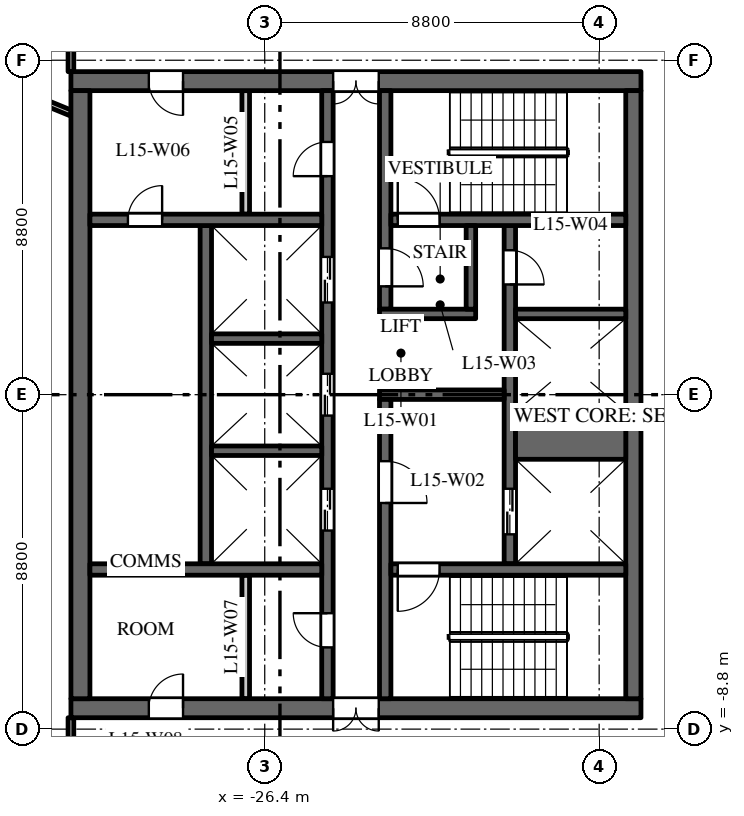
"""IFC4 building model, lengths in metres.
Left out: names, types, materials, properties, quantities, classifications, styles, units other than length and angle.
Written with IfcOpenShell. Run it as: python <this file> out.ifc"""

import sys

from ifc_helpers import new_model, si_unit, direction, frame, frame_2d, origin, place, context, subcontext, project, spatial, rectangle, extrude, element, fill, save


model = new_model("IFC4")
c1 = context("Model", 3, precision=1e-05, world=origin(), true_north=direction((0.0, 1.0)))
c2 = subcontext(c1, "Body", "Model", "MODEL_VIEW")
j1 = project(units=[si_unit("LENGTHUNIT", "METRE"), si_unit("PLANEANGLEUNIT", "RADIAN")], contexts=[c1])
p1 = place(None, origin())
s1 = spatial("IfcSite", under=j1, at=p1, CompositionType="ELEMENT")
p2 = place(p1, origin())
s2 = spatial("IfcBuilding", under=s1, at=p2, CompositionType="ELEMENT")
p3 = place(p2, frame((0.0, 0.0, 70.5)))
s3 = spatial("IfcBuildingStorey", under=s2, at=p3, CompositionType="ELEMENT", Elevation=70.5)
p4 = place(p3, frame((-16.5, 8.25, 0.0), z_axis=(0.0, 0.0, 1.0), x_axis=(-1.0, 0.0, 0.0)))
e1 = element("IfcWall", 1, at=p4, inside=s3, PredefinedType="SHEAR", context=c2, shape_type="SweptSolid", body=[
    extrude(rectangle(XDim=15.0, YDim=0.5, at=frame_2d((7.5, 0.0))), origin(), (0.0, 0.0, 1.0), 3.7),
])
p5 = place(p4, frame((6.9, 0.0, 0.0)))
e2 = element("IfcOpeningElement", 2, at=p5, cuts=e1, PredefinedType="OPENING", context=c2, shape_type="SweptSolid", body=[
    extrude(rectangle(XDim=1.2, YDim=2.1, at=frame_2d((0.6, 1.05))), frame((0.0, 0.26, 0.0), z_axis=(0.0, -1.0, 0.0), x_axis=(1.0, 0.0, 0.0)), (0.0, 0.0, 1.0), 0.52),
])
p6 = place(p4, frame((12.05, 0.0, 0.0)))
e3 = element("IfcOpeningElement", 3, at=p6, cuts=e1, PredefinedType="OPENING", context=c2, shape_type="SweptSolid", body=[
    extrude(rectangle(XDim=0.9, YDim=2.1, at=frame_2d((0.45, 1.05))), frame((0.0, 0.26, 0.0), z_axis=(0.0, -1.0, 0.0), x_axis=(1.0, 0.0, 0.0)), (0.0, 0.0, 1.0), 0.52),
])
p7 = place(p3, frame((-16.5, -8.25, 0.0), z_axis=(0.0, 0.0, 1.0), x_axis=(-1.0, 0.0, 0.0)))
e4 = element("IfcWall", 4, at=p7, inside=s3, PredefinedType="SHEAR", context=c2, shape_type="SweptSolid", body=[
    extrude(rectangle(XDim=15.0, YDim=0.5, at=frame_2d((7.5, 0.0))), origin(), (0.0, 0.0, 1.0), 3.7),
])
p8 = place(p7, frame((6.9, 0.0, 0.0)))
e5 = element("IfcOpeningElement", 5, at=p8, cuts=e4, PredefinedType="OPENING", context=c2, shape_type="SweptSolid", body=[
    extrude(rectangle(XDim=1.2, YDim=2.1, at=frame_2d((0.6, 1.05))), frame((0.0, 0.26, 0.0), z_axis=(0.0, -1.0, 0.0), x_axis=(1.0, 0.0, 0.0)), (0.0, 0.0, 1.0), 0.52),
])
p9 = place(p7, frame((12.05, 0.0, 0.0)))
e6 = element("IfcOpeningElement", 6, at=p9, cuts=e4, PredefinedType="OPENING", context=c2, shape_type="SweptSolid", body=[
    extrude(rectangle(XDim=0.9, YDim=2.1, at=frame_2d((0.45, 1.05))), frame((0.0, 0.26, 0.0), z_axis=(0.0, -1.0, 0.0), x_axis=(1.0, 0.0, 0.0)), (0.0, 0.0, 1.0), 0.52),
])
p10 = place(p3, frame((-27.95, -4.45, 0.0), z_axis=(0.0, 0.0, 1.0), x_axis=(0.0, 1.0, 0.0)))
e7 = element("IfcWall", 7, at=p10, inside=s3, PredefinedType="SHEAR", context=c2, shape_type="SweptSolid", body=[
    extrude(rectangle(XDim=8.9, YDim=0.3, at=frame_2d((4.45, 0.0))), origin(), (0.0, 0.0, 1.0), 3.7),
])
p11 = place(p3, frame((-19.95, -4.45, 0.0), z_axis=(0.0, 0.0, 1.0), x_axis=(0.0, 1.0, 0.0)))
e8 = element("IfcWall", 8, at=p11, inside=s3, PredefinedType="SHEAR", context=c2, shape_type="SweptSolid", body=[
    extrude(rectangle(XDim=8.9, YDim=0.3, at=frame_2d((4.45, 0.0))), origin(), (0.0, 0.0, 1.0), 3.7),
])
p12 = place(p11, frame((0.775, 0.0, 0.0)))
e9 = element("IfcOpeningElement", 9, at=p12, cuts=e8, PredefinedType="OPENING", context=c2, shape_type="SweptSolid", body=[
    extrude(rectangle(XDim=1.2, YDim=2.1, at=frame_2d((0.6, 1.05))), frame((0.0, 0.16, 0.0), z_axis=(0.0, -1.0, 0.0), x_axis=(1.0, 0.0, 0.0)), (0.0, 0.0, 1.0), 0.32),
])
p13 = place(p11, frame((7.35, 0.0, 0.0)))
e10 = element("IfcOpeningElement", 10, at=p13, cuts=e8, PredefinedType="OPENING", context=c2, shape_type="SweptSolid", body=[
    extrude(rectangle(XDim=0.9, YDim=2.1, at=frame_2d((0.45, 1.05))), frame((0.0, 0.16, 0.0), z_axis=(0.0, -1.0, 0.0), x_axis=(1.0, 0.0, 0.0)), (0.0, 0.0, 1.0), 0.32),
])
p14 = place(p3, frame((-24.75, -8.0, 0.0), z_axis=(0.0, 0.0, 1.0), x_axis=(0.0, 1.0, 0.0)))
e11 = element("IfcWall", 11, at=p14, inside=s3, PredefinedType="SHEAR", context=c2, shape_type="SweptSolid", body=[
    extrude(rectangle(XDim=16.0, YDim=0.3, at=frame_2d((8.0, 0.0))), origin(), (0.0, 0.0, 1.0), 3.7),
])
p15 = place(p14, frame((4.425, 0.0, 0.0)))
e12 = element("IfcOpeningElement", 12, at=p15, cuts=e11, PredefinedType="OPENING", context=c2, shape_type="SweptSolid", body=[
    extrude(rectangle(XDim=1.1, YDim=2.1, at=frame_2d((0.55, 1.05))), frame((0.0, 0.16, 0.0), z_axis=(0.0, -1.0, 0.0), x_axis=(1.0, 0.0, 0.0)), (0.0, 0.0, 1.0), 0.32),
])
p16 = place(p14, frame((7.45, 0.0, 0.0)))
e13 = element("IfcOpeningElement", 13, at=p16, cuts=e11, PredefinedType="OPENING", context=c2, shape_type="SweptSolid", body=[
    extrude(rectangle(XDim=1.1, YDim=2.1, at=frame_2d((0.55, 1.05))), frame((0.0, 0.16, 0.0), z_axis=(0.0, -1.0, 0.0), x_axis=(1.0, 0.0, 0.0)), (0.0, 0.0, 1.0), 0.32),
])
p17 = place(p14, frame((10.425, 0.0, 0.0)))
e14 = element("IfcOpeningElement", 14, at=p17, cuts=e11, PredefinedType="OPENING", context=c2, shape_type="SweptSolid", body=[
    extrude(rectangle(XDim=1.2, YDim=2.1, at=frame_2d((0.6, 1.05))), frame((0.0, 0.16, 0.0), z_axis=(0.0, -1.0, 0.0), x_axis=(1.0, 0.0, 0.0)), (0.0, 0.0, 1.0), 0.32),
])
p18 = place(p14, frame((13.75, 0.0, 0.0)))
e15 = element("IfcOpeningElement", 15, at=p18, cuts=e11, PredefinedType="OPENING", context=c2, shape_type="SweptSolid", body=[
    extrude(rectangle(XDim=0.9, YDim=2.1, at=frame_2d((0.45, 1.05))), frame((0.0, 0.16, 0.0), z_axis=(0.0, -1.0, 0.0), x_axis=(1.0, 0.0, 0.0)), (0.0, 0.0, 1.0), 0.32),
])
p19 = place(p14, frame((1.35, 0.0, 0.0)))
e16 = element("IfcOpeningElement", 16, at=p19, cuts=e11, PredefinedType="OPENING", context=c2, shape_type="SweptSolid", body=[
    extrude(rectangle(XDim=0.9, YDim=2.1, at=frame_2d((0.45, 1.05))), frame((0.0, 0.16, 0.0), z_axis=(0.0, -1.0, 0.0), x_axis=(1.0, 0.0, 0.0)), (0.0, 0.0, 1.0), 0.32),
])
p20 = place(p3, frame((-20.1, 0.0, 0.0), z_axis=(0.0, 0.0, 1.0), x_axis=(-1.0, 0.0, 0.0)))
e17 = element("IfcWall", 17, at=p20, inside=s3, PredefinedType="SHEAR", context=c2, shape_type="SweptSolid", body=[
    extrude(rectangle(XDim=3.28, YDim=0.25, at=frame_2d((1.64, 0.0))), origin(), (0.0, 0.0, 1.0), 3.7),
])
p21 = place(p3, frame((-16.7, -8.0, 0.0), z_axis=(0.0, 0.0, 1.0), x_axis=(0.0, 1.0, 0.0)))
e18 = element("IfcWall", 18, at=p21, inside=s3, PredefinedType="SHEAR", context=c2, shape_type="SweptSolid", body=[
    extrude(rectangle(XDim=16.0, YDim=0.4, at=frame_2d((8.0, 0.0))), origin(), (0.0, 0.0, 1.0), 3.7),
])
p22 = place(p3, frame((-31.25, -8.0, 0.0), z_axis=(0.0, 0.0, 1.0), x_axis=(0.0, 1.0, 0.0)))
e19 = element("IfcWall", 19, at=p22, inside=s3, PredefinedType="SHEAR", context=c2, shape_type="SweptSolid", body=[
    extrude(rectangle(XDim=16.0, YDim=0.5, at=frame_2d((8.0, 0.0))), origin(), (0.0, 0.0, 1.0), 3.7),
])
p23 = place(p3, frame((-24.9, 4.6, 0.0), z_axis=(0.0, 0.0, 1.0), x_axis=(-1.0, 0.0, 0.0)))
e20 = element("IfcWall", 20, at=p23, inside=s3, PredefinedType="SHEAR", context=c2, shape_type="SweptSolid", body=[
    extrude(rectangle(XDim=6.1, YDim=0.3, at=frame_2d((3.05, 0.0))), origin(), (0.0, 0.0, 1.0), 3.7),
])
p24 = place(p23, frame((4.2, 0.0, 0.0)))
e21 = element("IfcOpeningElement", 21, at=p24, cuts=e20, PredefinedType="OPENING", context=c2, shape_type="SweptSolid", body=[
    extrude(rectangle(XDim=0.9, YDim=2.1, at=frame_2d((0.45, 1.05))), frame((0.0, 0.16, 0.0), z_axis=(0.0, -1.0, 0.0), x_axis=(1.0, 0.0, 0.0)), (0.0, 0.0, 1.0), 0.32),
])
for number, where, z_axis, x_axis in (
    (22, (-26.9, 4.75, 0.0), (0.0, 0.0, 1.0), (0.0, 1.0, 0.0)),
    (23, (-26.9, -8.0, 0.0), (0.0, 0.0, 1.0), (0.0, 1.0, 0.0)),
):
    element("IfcWall", number, at=place(p3, frame(where, z_axis=z_axis, x_axis=x_axis)), inside=s3, PredefinedType="PARTITIONING", context=c2, shape_type="SweptSolid", body=[
        extrude(rectangle(XDim=3.25, YDim=0.2, at=frame_2d((1.625, 0.0))), origin(), (0.0, 0.0, 1.0), 3.7),
    ])
p25 = place(p3, frame((-24.9, -4.6, 0.0), z_axis=(0.0, 0.0, 1.0), x_axis=(-1.0, 0.0, 0.0)))
e24 = element("IfcWall", 24, at=p25, inside=s3, PredefinedType="SHEAR", context=c2, shape_type="SweptSolid", body=[
    extrude(rectangle(XDim=6.1, YDim=0.3, at=frame_2d((3.05, 0.0))), origin(), (0.0, 0.0, 1.0), 3.7),
])
p26 = place(p3, frame((-16.9, -1.075, 0.0), z_axis=(0.0, 0.0, 1.0), x_axis=(-1.0, 0.0, 0.0)))
e25 = element("IfcWall", 25, at=p26, inside=s3, PredefinedType="SHEAR", context=c2, shape_type="SweptSolid", body=[
    extrude(rectangle(XDim=2.9, YDim=1.25, at=frame_2d((1.45, 0.0))), origin(), (0.0, 0.0, 1.0), 3.7),
])
for number, where, z_axis, x_axis in (
    (26, (-16.9, 2.125, 0.0), (0.0, 0.0, 1.0), (-1.0, 0.0, 0.0)),
    (27, (-24.9, -1.475, 0.0), (0.0, 0.0, 1.0), (-1.0, 0.0, 0.0)),
    (28, (-24.9, 1.475, 0.0), (0.0, 0.0, 1.0), (-1.0, 0.0, 0.0)),
):
    element("IfcWall", number, at=place(p3, frame(where, z_axis=z_axis, x_axis=x_axis)), inside=s3, PredefinedType="SHEAR", context=c2, shape_type="SweptSolid", body=[
        extrude(rectangle(XDim=2.9, YDim=0.25, at=frame_2d((1.45, 0.0))), origin(), (0.0, 0.0, 1.0), 3.7),
    ])
p27 = place(p3, frame((-23.23, 2.25, 0.0), z_axis=(0.0, 0.0, 1.0), x_axis=(0.0, 1.0, 0.0)))
e29 = element("IfcWall", 29, at=p27, inside=s3, PredefinedType="SHEAR", context=c2, shape_type="SweptSolid", body=[
    extrude(rectangle(XDim=5.75, YDim=0.3, at=frame_2d((2.875, 0.0))), origin(), (0.0, 0.0, 1.0), 3.7),
])
p28 = place(p27, frame((0.6, 0.0, 0.0)))
e30 = element("IfcOpeningElement", 30, at=p28, cuts=e29, PredefinedType="OPENING", context=c2, shape_type="SweptSolid", body=[
    extrude(rectangle(XDim=1.0, YDim=2.1, at=frame_2d((0.5, 1.05))), frame((0.0, 0.16, 0.0), z_axis=(0.0, -1.0, 0.0), x_axis=(1.0, 0.0, 0.0)), (0.0, 0.0, 1.0), 0.32),
])
p29 = place(p3, frame((-23.23, -8.0, 0.0), z_axis=(0.0, 0.0, 1.0), x_axis=(0.0, 1.0, 0.0)))
e31 = element("IfcWall", 31, at=p29, inside=s3, PredefinedType="SHEAR", context=c2, shape_type="SweptSolid", body=[
    extrude(rectangle(XDim=7.875, YDim=0.3, at=frame_2d((3.938, 0.0))), origin(), (0.0, 0.0, 1.0), 3.7),
])
p30 = place(p29, frame((5.15, 0.0, 0.0)))
e32 = element("IfcOpeningElement", 32, at=p30, cuts=e31, PredefinedType="OPENING", context=c2, shape_type="SweptSolid", body=[
    extrude(rectangle(XDim=1.1, YDim=2.1, at=frame_2d((0.55, 1.05))), frame((0.0, 0.16, 0.0), z_axis=(0.0, -1.0, 0.0), x_axis=(1.0, 0.0, 0.0)), (0.0, 0.0, 1.0), 0.32),
])
p31 = place(p3, frame((-16.9, 4.6, 0.0), z_axis=(0.0, 0.0, 1.0), x_axis=(-1.0, 0.0, 0.0)))
e33 = element("IfcWall", 33, at=p31, inside=s3, PredefinedType="SHEAR", context=c2, shape_type="SweptSolid", body=[
    extrude(rectangle(XDim=6.18, YDim=0.3, at=frame_2d((3.09, 0.0))), origin(), (0.0, 0.0, 1.0), 3.7),
])
p32 = place(p31, frame((4.9, 0.0, 0.0)))
e34 = element("IfcOpeningElement", 34, at=p32, cuts=e33, PredefinedType="OPENING", context=c2, shape_type="SweptSolid", body=[
    extrude(rectangle(XDim=1.1, YDim=2.1, at=frame_2d((0.55, 1.05))), frame((0.0, 0.16, 0.0), z_axis=(0.0, -1.0, 0.0), x_axis=(1.0, 0.0, 0.0)), (0.0, 0.0, 1.0), 0.32),
])
p33 = place(p3, frame((-16.9, -4.6, 0.0), z_axis=(0.0, 0.0, 1.0), x_axis=(-1.0, 0.0, 0.0)))
e35 = element("IfcWall", 35, at=p33, inside=s3, PredefinedType="SHEAR", context=c2, shape_type="SweptSolid", body=[
    extrude(rectangle(XDim=6.18, YDim=0.3, at=frame_2d((3.09, 0.0))), origin(), (0.0, 0.0, 1.0), 3.7),
])
p34 = place(p33, frame((4.9, 0.0, 0.0)))
e36 = element("IfcOpeningElement", 36, at=p34, cuts=e35, PredefinedType="OPENING", context=c2, shape_type="SweptSolid", body=[
    extrude(rectangle(XDim=1.1, YDim=2.1, at=frame_2d((0.55, 1.05))), frame((0.0, 0.16, 0.0), z_axis=(0.0, -1.0, 0.0), x_axis=(1.0, 0.0, 0.0)), (0.0, 0.0, 1.0), 0.32),
])
p35 = place(p3, frame((-20.85, 2.125, 0.0), z_axis=(0.0, 0.0, 1.0), x_axis=(-1.0, 0.0, 0.0)))
e37 = element("IfcWall", 37, at=p35, inside=s3, PredefinedType="SHEAR", context=c2, shape_type="SweptSolid", body=[
    extrude(rectangle(XDim=2.53, YDim=0.25, at=frame_2d((1.265, 0.0))), origin(), (0.0, 0.0, 1.0), 3.7),
])
p36 = place(p3, frame((-20.975, 2.25, 0.0), z_axis=(0.0, 0.0, 1.0), x_axis=(0.0, 1.0, 0.0)))
e38 = element("IfcWall", 38, at=p36, inside=s3, PredefinedType="SHEAR", context=c2, shape_type="SweptSolid", body=[
    extrude(rectangle(XDim=2.2, YDim=0.25, at=frame_2d((1.1, 0.0))), origin(), (0.0, 0.0, 1.0), 3.7),
])
p37 = place(p3, frame((-34.234, 8.53, 0.0), z_axis=(0.0, 0.0, 1.0), x_axis=(0.925344112436, -0.379128307542, 0.0)))
e39 = element("IfcWall", 39, at=p37, inside=s3, PredefinedType="PARTITIONING", context=c2, shape_type="SweptSolid", body=[
    extrude(rectangle(XDim=2.954, YDim=0.15, at=frame_2d((1.477, 0.0))), origin(), (0.0, 0.0, 1.0), 2.85),
])
for number, where, z_axis, x_axis in (
    (40, (-31.5, -10.7, 0.0), (0.0, 0.0, 1.0), (0.0, 1.0, 0.0)),
    (41, (-31.5, 8.5, 0.0), (0.0, 0.0, 1.0), (0.0, 1.0, 0.0)),
):
    element("IfcWall", number, at=place(p3, frame(where, z_axis=z_axis, x_axis=x_axis)), inside=s3, PredefinedType="PARTITIONING", context=c2, shape_type="SweptSolid", body=[
        extrude(rectangle(XDim=2.2, YDim=0.15, at=frame_2d((1.1, 0.0))), origin(), (0.0, 0.0, 1.0), 3.7),
    ])
p38 = place(p12, origin())
e42 = element("IfcDoor", 42, at=p38, inside=s3, OperationType="DOUBLE_DOOR_SLIDING", PredefinedType="DOOR", context=c2, shape_type="SweptSolid", body=[
    extrude(rectangle(XDim=1.2, YDim=2.1, at=frame_2d((0.6, 1.05))), frame((0.0, 0.025, 0.0), z_axis=(0.0, -1.0, 0.0), x_axis=(1.0, 0.0, 0.0)), (0.0, 0.0, 1.0), 0.05),
])
fill(e9, e42)
p39 = place(p15, origin())
e43 = element("IfcDoor", 43, at=p39, inside=s3, OperationType="DOUBLE_DOOR_SLIDING", PredefinedType="DOOR", context=c2, shape_type="SweptSolid", body=[
    extrude(rectangle(XDim=1.1, YDim=2.1, at=frame_2d((0.55, 1.05))), frame((0.0, 0.025, 0.0), z_axis=(0.0, -1.0, 0.0), x_axis=(1.0, 0.0, 0.0)), (0.0, 0.0, 1.0), 0.05),
])
fill(e12, e43)
p40 = place(p16, origin())
e44 = element("IfcDoor", 44, at=p40, inside=s3, OperationType="DOUBLE_DOOR_SLIDING", PredefinedType="DOOR", context=c2, shape_type="SweptSolid", body=[
    extrude(rectangle(XDim=1.1, YDim=2.1, at=frame_2d((0.55, 1.05))), frame((0.0, 0.025, 0.0), z_axis=(0.0, -1.0, 0.0), x_axis=(1.0, 0.0, 0.0)), (0.0, 0.0, 1.0), 0.05),
])
fill(e13, e44)
p41 = place(p17, origin())
e45 = element("IfcDoor", 45, at=p41, inside=s3, OperationType="DOUBLE_DOOR_SLIDING", PredefinedType="DOOR", context=c2, shape_type="SweptSolid", body=[
    extrude(rectangle(XDim=1.2, YDim=2.1, at=frame_2d((0.6, 1.05))), frame((0.0, 0.025, 0.0), z_axis=(0.0, -1.0, 0.0), x_axis=(1.0, 0.0, 0.0)), (0.0, 0.0, 1.0), 0.05),
])
fill(e14, e45)
p42 = place(p32, origin())
e46 = element("IfcDoor", 46, at=p42, inside=s3, OperationType="SINGLE_SWING_RIGHT", PredefinedType="DOOR", context=c2, shape_type="SweptSolid", body=[
    extrude(rectangle(XDim=1.1, YDim=2.1, at=frame_2d((0.55, 1.05))), frame((0.0, 0.025, 0.0), z_axis=(0.0, -1.0, 0.0), x_axis=(1.0, 0.0, 0.0)), (0.0, 0.0, 1.0), 0.05),
])
fill(e34, e46)
p43 = place(p34, origin())
e47 = element("IfcDoor", 47, at=p43, inside=s3, OperationType="SINGLE_SWING_LEFT", PredefinedType="DOOR", context=c2, shape_type="SweptSolid", body=[
    extrude(rectangle(XDim=1.1, YDim=2.1, at=frame_2d((0.55, 1.05))), frame((0.0, 0.025, 0.0), z_axis=(0.0, -1.0, 0.0), x_axis=(1.0, 0.0, 0.0)), (0.0, 0.0, 1.0), 0.05),
])
fill(e36, e47)
p44 = place(p30, origin())
e48 = element("IfcDoor", 48, at=p44, inside=s3, OperationType="SINGLE_SWING_LEFT", PredefinedType="DOOR", context=c2, shape_type="SweptSolid", body=[
    extrude(rectangle(XDim=1.1, YDim=2.1, at=frame_2d((0.55, 1.05))), frame((0.0, 0.025, 0.0), z_axis=(0.0, -1.0, 0.0), x_axis=(1.0, 0.0, 0.0)), (0.0, 0.0, 1.0), 0.05),
])
fill(e32, e48)
p45 = place(p28, origin())
e49 = element("IfcDoor", 49, at=p45, inside=s3, OperationType="SINGLE_SWING_LEFT", PredefinedType="DOOR", context=c2, shape_type="SweptSolid", body=[
    extrude(rectangle(XDim=1.0, YDim=2.1, at=frame_2d((0.5, 1.05))), frame((0.0, 0.025, 0.0), z_axis=(0.0, -1.0, 0.0), x_axis=(1.0, 0.0, 0.0)), (0.0, 0.0, 1.0), 0.05),
])
fill(e30, e49)
p46 = place(p5, origin())
e50 = element("IfcDoor", 50, at=p46, inside=s3, OperationType="DOUBLE_DOOR_DOUBLE_SWING", PredefinedType="DOOR", context=c2, shape_type="SweptSolid", body=[
    extrude(rectangle(XDim=1.2, YDim=2.1, at=frame_2d((0.6, 1.05))), frame((0.0, 0.025, 0.0), z_axis=(0.0, -1.0, 0.0), x_axis=(1.0, 0.0, 0.0)), (0.0, 0.0, 1.0), 0.05),
])
fill(e2, e50)
p47 = place(p8, origin())
e51 = element("IfcDoor", 51, at=p47, inside=s3, OperationType="DOUBLE_DOOR_DOUBLE_SWING", PredefinedType="DOOR", context=c2, shape_type="SweptSolid", body=[
    extrude(rectangle(XDim=1.2, YDim=2.1, at=frame_2d((0.6, 1.05))), frame((0.0, 0.025, 0.0), z_axis=(0.0, -1.0, 0.0), x_axis=(1.0, 0.0, 0.0)), (0.0, 0.0, 1.0), 0.05),
])
fill(e5, e51)
p48 = place(p13, origin())
e52 = element("IfcDoor", 52, at=p48, inside=s3, OperationType="SINGLE_SWING_LEFT", PredefinedType="DOOR", context=c2, shape_type="SweptSolid", body=[
    extrude(rectangle(XDim=0.9, YDim=2.1, at=frame_2d((0.45, 1.05))), frame((0.0, 0.025, 0.0), z_axis=(0.0, -1.0, 0.0), x_axis=(1.0, 0.0, 0.0)), (0.0, 0.0, 1.0), 0.05),
])
fill(e10, e52)
p49 = place(p18, origin())
e53 = element("IfcDoor", 53, at=p49, inside=s3, OperationType="SINGLE_SWING_RIGHT", PredefinedType="DOOR", context=c2, shape_type="SweptSolid", body=[
    extrude(rectangle(XDim=0.9, YDim=2.1, at=frame_2d((0.45, 1.05))), frame((0.0, 0.025, 0.0), z_axis=(0.0, -1.0, 0.0), x_axis=(1.0, 0.0, 0.0)), (0.0, 0.0, 1.0), 0.05),
])
fill(e15, e53)
p50 = place(p6, origin())
e54 = element("IfcDoor", 54, at=p50, inside=s3, OperationType="SINGLE_SWING_RIGHT", PredefinedType="DOOR", context=c2, shape_type="SweptSolid", body=[
    extrude(rectangle(XDim=0.9, YDim=2.1, at=frame_2d((0.45, 1.05))), frame((0.0, 0.025, 0.0), z_axis=(0.0, -1.0, 0.0), x_axis=(1.0, 0.0, 0.0)), (0.0, 0.0, 1.0), 0.05),
])
fill(e3, e54)
p51 = place(p19, origin())
e55 = element("IfcDoor", 55, at=p51, inside=s3, OperationType="SINGLE_SWING_LEFT", PredefinedType="DOOR", context=c2, shape_type="SweptSolid", body=[
    extrude(rectangle(XDim=0.9, YDim=2.1, at=frame_2d((0.45, 1.05))), frame((0.0, 0.025, 0.0), z_axis=(0.0, -1.0, 0.0), x_axis=(1.0, 0.0, 0.0)), (0.0, 0.0, 1.0), 0.05),
])
fill(e16, e55)
p52 = place(p9, origin())
e56 = element("IfcDoor", 56, at=p52, inside=s3, OperationType="SINGLE_SWING_LEFT", PredefinedType="DOOR", context=c2, shape_type="SweptSolid", body=[
    extrude(rectangle(XDim=0.9, YDim=2.1, at=frame_2d((0.45, 1.05))), frame((0.0, 0.025, 0.0), z_axis=(0.0, -1.0, 0.0), x_axis=(1.0, 0.0, 0.0)), (0.0, 0.0, 1.0), 0.05),
])
fill(e6, e56)
p53 = place(p24, origin())
e57 = element("IfcDoor", 57, at=p53, inside=s3, OperationType="SINGLE_SWING_LEFT", PredefinedType="DOOR", context=c2, shape_type="SweptSolid", body=[
    extrude(rectangle(XDim=0.9, YDim=2.1, at=frame_2d((0.45, 1.05))), frame((0.0, 0.025, 0.0), z_axis=(0.0, -1.0, 0.0), x_axis=(1.0, 0.0, 0.0)), (0.0, 0.0, 1.0), 0.05),
])
fill(e21, e57)
save(model, sys.argv[1])
